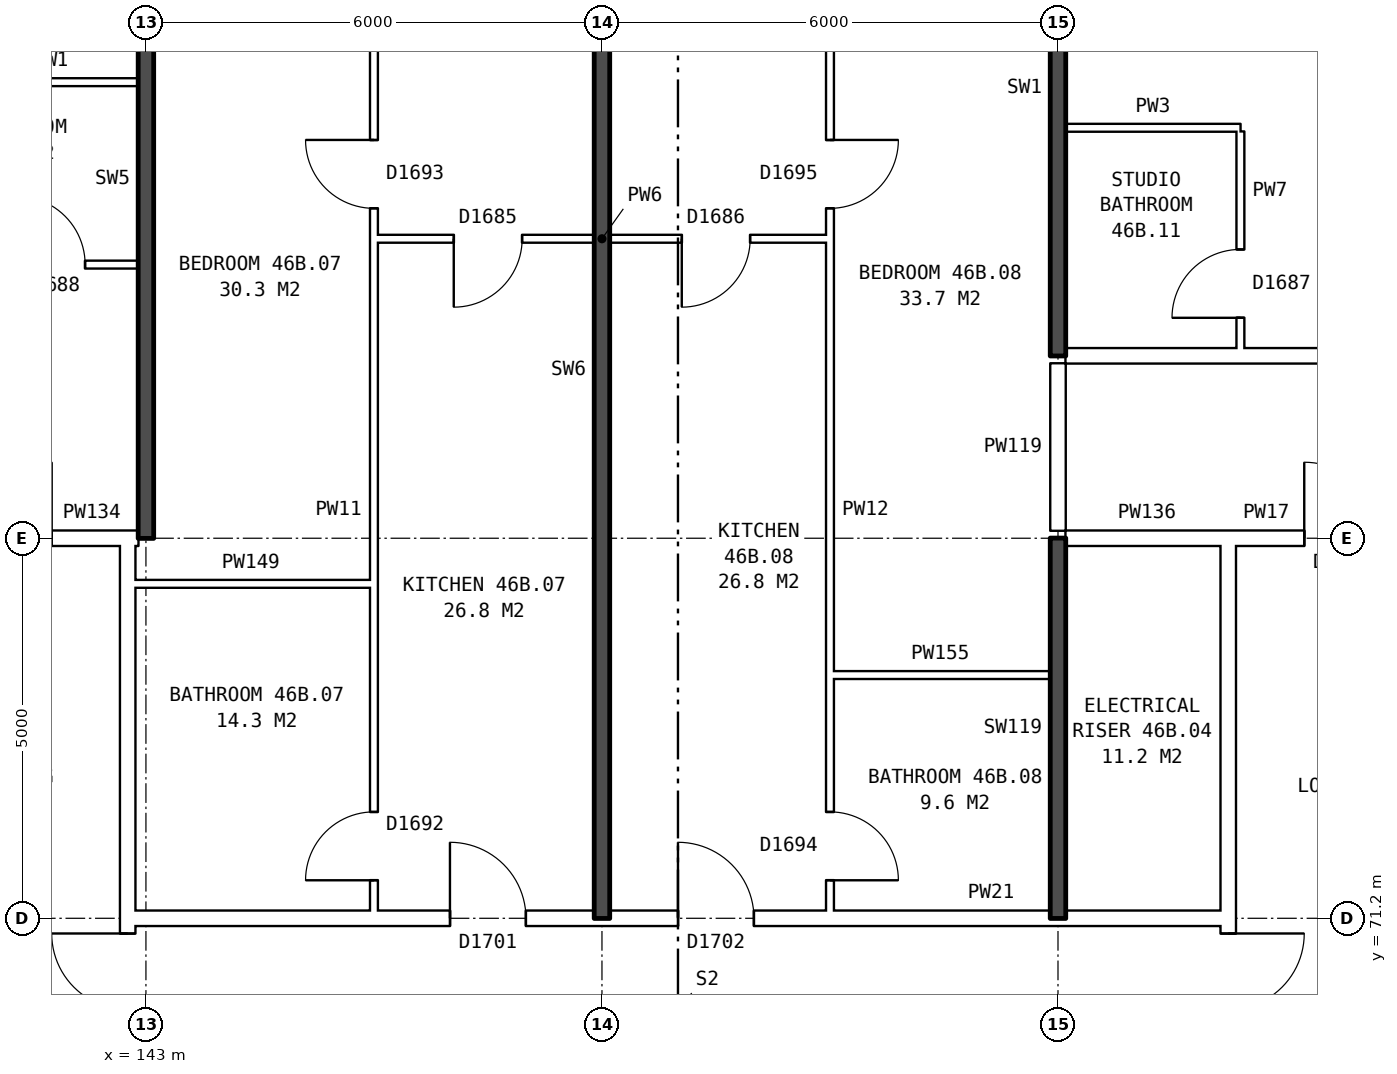
"""IFC4 building model, lengths in metres.
Left out: names, types, materials, properties, quantities, classifications, styles, units other than length and angle.
Written with IfcOpenShell. Run it as: python <this file> out.ifc"""

import sys

from ifc_helpers import new_model, si_unit, direction, frame, frame_2d, origin, place, context, subcontext, project, spatial, rectangle, extrude, element, fill, save


model = new_model("IFC4")
c1 = context("Model", 3, precision=1e-05, world=origin(), true_north=direction((0.0, 1.0)))
c2 = subcontext(c1, "Body", "Model", "MODEL_VIEW")
j1 = project(units=[si_unit("LENGTHUNIT", "METRE"), si_unit("PLANEANGLEUNIT", "RADIAN")], contexts=[c1])
p1 = place(None, origin())
s1 = spatial("IfcSite", under=j1, at=p1, CompositionType="ELEMENT")
p2 = place(p1, origin())
s2 = spatial("IfcBuilding", under=s1, at=p2, CompositionType="ELEMENT")
p3 = place(p2, frame((0.0, 0.0, 164.0)))
s3 = spatial("IfcBuildingStorey", under=s2, at=p3, CompositionType="ELEMENT", Elevation=164.0)
p4 = place(p3, frame((142.76, 63.9, 0.0), z_axis=(0.0, 0.0, 1.0), x_axis=(0.0, 1.0, 0.0)))
e1 = element("IfcWall", 1, at=p4, inside=s3, PredefinedType="PARTITIONING", context=c2, shape_type="SweptSolid", body=[
    extrude(rectangle(XDim=12.2, YDim=0.2, at=frame_2d((6.1, 0.0))), origin(), (0.0, 0.0, 1.0), 2.85),
])
p5 = place(p4, frame((5.1, 0.0, 0.0)))
e2 = element("IfcOpeningElement", 2, at=p5, cuts=e1, PredefinedType="OPENING", context=c2, shape_type="SweptSolid", body=[
    extrude(rectangle(XDim=2.0, YDim=2.1, at=frame_2d((1.0, 1.05))), frame((0.0, 0.11, 0.0), z_axis=(0.0, -1.0, 0.0), x_axis=(1.0, 0.0, 0.0)), (0.0, 0.0, 1.0), 0.22),
])
p6 = place(p3, frame((157.24, 63.9, 0.0), z_axis=(0.0, 0.0, 1.0), x_axis=(0.0, 1.0, 0.0)))
e3 = element("IfcWall", 3, at=p6, inside=s3, PredefinedType="PARTITIONING", context=c2, shape_type="SweptSolid", body=[
    extrude(rectangle(XDim=12.2, YDim=0.2, at=frame_2d((6.1, 0.0))), origin(), (0.0, 0.0, 1.0), 2.85),
])
p7 = place(p6, frame((5.1, 0.0, 0.0)))
e4 = element("IfcOpeningElement", 4, at=p7, cuts=e3, PredefinedType="OPENING", context=c2, shape_type="SweptSolid", body=[
    extrude(rectangle(XDim=2.0, YDim=2.1, at=frame_2d((1.0, 1.05))), frame((0.0, 0.11, 0.0), z_axis=(0.0, -1.0, 0.0), x_axis=(1.0, 0.0, 0.0)), (0.0, 0.0, 1.0), 0.22),
])
p8 = place(p3, frame((142.76, 71.2, 0.0), z_axis=(0.0, 0.0, 1.0), x_axis=(1.0, 0.0, 0.0)))
e5 = element("IfcWall", 5, at=p8, inside=s3, PredefinedType="PARTITIONING", context=c2, shape_type="SweptSolid", body=[
    extrude(rectangle(XDim=14.48, YDim=0.2, at=frame_2d((7.24, 0.0))), origin(), (0.0, 0.0, 1.0), 2.85),
])
p9 = place(p8, frame((4.24, 0.0, 0.0)))
e6 = element("IfcOpeningElement", 6, at=p9, cuts=e5, PredefinedType="OPENING", context=c2, shape_type="SweptSolid", body=[
    extrude(rectangle(XDim=1.0, YDim=2.1, at=frame_2d((0.5, 1.05))), frame((0.0, 0.11, 0.0), z_axis=(0.0, -1.0, 0.0), x_axis=(1.0, 0.0, 0.0)), (0.0, 0.0, 1.0), 0.22),
])
p10 = place(p8, frame((7.24, 0.0, 0.0)))
e7 = element("IfcOpeningElement", 7, at=p10, cuts=e5, PredefinedType="OPENING", context=c2, shape_type="SweptSolid", body=[
    extrude(rectangle(XDim=1.0, YDim=2.1, at=frame_2d((0.5, 1.05))), frame((0.0, 0.11, 0.0), z_axis=(0.0, -1.0, 0.0), x_axis=(1.0, 0.0, 0.0)), (0.0, 0.0, 1.0), 0.22),
])
p11 = place(p3, frame((152.0, 74.4, 0.0), z_axis=(0.0, 0.0, 1.0), x_axis=(1.0, 0.0, 0.0)))
e8 = element("IfcWall", 8, at=p11, inside=s3, PredefinedType="PARTITIONING", context=c2, shape_type="SweptSolid", body=[
    extrude(rectangle(XDim=2.9, YDim=0.1, at=frame_2d((1.45, 0.0))), origin(), (0.0, 0.0, 1.0), 2.85),
])
p12 = place(p3, frame((142.76, 75.6, 0.0), z_axis=(0.0, 0.0, 1.0), x_axis=(1.0, 0.0, 0.0)))
e9 = element("IfcWall", 9, at=p12, inside=s3, PredefinedType="PARTITIONING", context=c2, shape_type="SweptSolid", body=[
    extrude(rectangle(XDim=3.24, YDim=0.1, at=frame_2d((1.62, 0.0))), origin(), (0.0, 0.0, 1.0), 2.85),
])
p13 = place(p3, frame((139.76, 76.2, 0.0), z_axis=(0.0, 0.0, 1.0), x_axis=(1.0, 0.0, 0.0)))
e10 = element("IfcWall", 10, at=p13, inside=s3, PredefinedType="PARTITIONING", context=c2, shape_type="SweptSolid", body=[
    extrude(rectangle(XDim=3.0, YDim=0.2, at=frame_2d((1.5, 0.0))), origin(), (0.0, 0.0, 1.0), 2.85),
])
p14 = place(p13, frame((1.0, 0.0, 0.0)))
e11 = element("IfcOpeningElement", 11, at=p14, cuts=e10, PredefinedType="OPENING", context=c2, shape_type="SweptSolid", body=[
    extrude(rectangle(XDim=1.0, YDim=2.1, at=frame_2d((0.5, 1.05))), frame((0.0, 0.11, 0.0), z_axis=(0.0, -1.0, 0.0), x_axis=(1.0, 0.0, 0.0)), (0.0, 0.0, 1.0), 0.22),
])
p15 = place(p3, frame((142.76, 76.2, 0.0), z_axis=(0.0, 0.0, 1.0), x_axis=(1.0, 0.0, 0.0)))
e12 = element("IfcWall", 12, at=p15, inside=s3, PredefinedType="PARTITIONING", context=c2, shape_type="SweptSolid", body=[
    extrude(rectangle(XDim=0.14, YDim=0.2, at=frame_2d((0.07, 0.0))), origin(), (0.0, 0.0, 1.0), 2.85),
])
p16 = place(p3, frame((155.1, 76.2, 0.0), z_axis=(0.0, 0.0, 1.0), x_axis=(1.0, 0.0, 0.0)))
e13 = element("IfcWall", 13, at=p16, inside=s3, PredefinedType="PARTITIONING", context=c2, shape_type="SweptSolid", body=[
    extrude(rectangle(XDim=2.14, YDim=0.2, at=frame_2d((1.07, 0.0))), origin(), (0.0, 0.0, 1.0), 2.85),
])
p17 = place(p3, frame((157.24, 76.2, 0.0), z_axis=(0.0, 0.0, 1.0), x_axis=(1.0, 0.0, 0.0)))
e14 = element("IfcWall", 14, at=p17, inside=s3, PredefinedType="PARTITIONING", context=c2, shape_type="SweptSolid", body=[
    extrude(rectangle(XDim=3.0, YDim=0.2, at=frame_2d((1.5, 0.0))), origin(), (0.0, 0.0, 1.0), 2.85),
])
p18 = place(p17, frame((1.0, 0.0, 0.0)))
e15 = element("IfcOpeningElement", 15, at=p18, cuts=e14, PredefinedType="OPENING", context=c2, shape_type="SweptSolid", body=[
    extrude(rectangle(XDim=1.0, YDim=2.1, at=frame_2d((0.5, 1.05))), frame((0.0, 0.11, 0.0), z_axis=(0.0, -1.0, 0.0), x_axis=(1.0, 0.0, 0.0)), (0.0, 0.0, 1.0), 0.22),
])
p19 = place(p3, frame((155.1, 78.6, 0.0), z_axis=(0.0, 0.0, 1.0), x_axis=(1.0, 0.0, 0.0)))
e16 = element("IfcWall", 16, at=p19, inside=s3, PredefinedType="PARTITIONING", context=c2, shape_type="SweptSolid", body=[
    extrude(rectangle(XDim=16.04, YDim=0.2, at=frame_2d((8.02, 0.0))), origin(), (0.0, 0.0, 1.0), 2.85),
])
p20 = place(p19, frame((3.6, 0.0, 0.0)))
e17 = element("IfcOpeningElement", 17, at=p20, cuts=e16, PredefinedType="OPENING", context=c2, shape_type="SweptSolid", body=[
    extrude(rectangle(XDim=1.0, YDim=2.1, at=frame_2d((0.5, 1.05))), frame((0.0, 0.11, 0.0), z_axis=(0.0, -1.0, 0.0), x_axis=(1.0, 0.0, 0.0)), (0.0, 0.0, 1.0), 0.22),
])
p21 = place(p19, frame((8.4, 0.0, 0.0)))
e18 = element("IfcOpeningElement", 18, at=p21, cuts=e16, PredefinedType="OPENING", context=c2, shape_type="SweptSolid", body=[
    extrude(rectangle(XDim=1.0, YDim=2.1, at=frame_2d((0.5, 1.05))), frame((0.0, 0.11, 0.0), z_axis=(0.0, -1.0, 0.0), x_axis=(1.0, 0.0, 0.0)), (0.0, 0.0, 1.0), 0.22),
])
p22 = place(p3, frame((137.1, 79.8, 0.0), z_axis=(0.0, 0.0, 1.0), x_axis=(1.0, 0.0, 0.0)))
e19 = element("IfcWall", 19, at=p22, inside=s3, PredefinedType="PARTITIONING", context=c2, shape_type="SweptSolid", body=[
    extrude(rectangle(XDim=5.8, YDim=0.1, at=frame_2d((2.9, 0.0))), origin(), (0.0, 0.0, 1.0), 2.85),
])
p23 = place(p22, frame((1.3, 0.0, 0.0)))
e20 = element("IfcOpeningElement", 20, at=p23, cuts=e19, PredefinedType="OPENING", context=c2, shape_type="SweptSolid", body=[
    extrude(rectangle(XDim=0.9, YDim=2.1, at=frame_2d((0.45, 1.05))), frame((0.0, 0.06, 0.0), z_axis=(0.0, -1.0, 0.0), x_axis=(1.0, 0.0, 0.0)), (0.0, 0.0, 1.0), 0.12),
])
p24 = place(p22, frame((4.2, 0.0, 0.0)))
e21 = element("IfcOpeningElement", 21, at=p24, cuts=e19, PredefinedType="OPENING", context=c2, shape_type="SweptSolid", body=[
    extrude(rectangle(XDim=0.9, YDim=2.1, at=frame_2d((0.45, 1.05))), frame((0.0, 0.06, 0.0), z_axis=(0.0, -1.0, 0.0), x_axis=(1.0, 0.0, 0.0)), (0.0, 0.0, 1.0), 0.12),
])
p25 = place(p3, frame((146.0, 80.14, 0.0), z_axis=(0.0, 0.0, 1.0), x_axis=(1.0, 0.0, 0.0)))
e22 = element("IfcWall", 22, at=p25, inside=s3, PredefinedType="PARTITIONING", context=c2, shape_type="SweptSolid", body=[
    extrude(rectangle(XDim=6.0, YDim=0.1, at=frame_2d((3.0, 0.0))), origin(), (0.0, 0.0, 1.0), 2.85),
])
p26 = place(p25, frame((1.05, 0.0, 0.0)))
e23 = element("IfcOpeningElement", 23, at=p26, cuts=e22, PredefinedType="OPENING", context=c2, shape_type="SweptSolid", body=[
    extrude(rectangle(XDim=0.9, YDim=2.1, at=frame_2d((0.45, 1.05))), frame((0.0, 0.06, 0.0), z_axis=(0.0, -1.0, 0.0), x_axis=(1.0, 0.0, 0.0)), (0.0, 0.0, 1.0), 0.12),
])
p27 = place(p25, frame((4.05, 0.0, 0.0)))
e24 = element("IfcOpeningElement", 24, at=p27, cuts=e22, PredefinedType="OPENING", context=c2, shape_type="SweptSolid", body=[
    extrude(rectangle(XDim=0.9, YDim=2.1, at=frame_2d((0.45, 1.05))), frame((0.0, 0.06, 0.0), z_axis=(0.0, -1.0, 0.0), x_axis=(1.0, 0.0, 0.0)), (0.0, 0.0, 1.0), 0.12),
])
for number, where, z_axis, x_axis in (
    (25, (155.1, 81.6, 0.0), (0.0, 0.0, 1.0), (1.0, 0.0, 0.0)),
    (26, (140.6, 82.2, 0.0), (0.0, 0.0, 1.0), (1.0, 0.0, 0.0)),
):
    element("IfcWall", number, at=place(p3, frame(where, z_axis=z_axis, x_axis=x_axis)), inside=s3, PredefinedType="PARTITIONING", context=c2, shape_type="SweptSolid", body=[
        extrude(rectangle(XDim=2.3, YDim=0.1, at=frame_2d((1.15, 0.0))), origin(), (0.0, 0.0, 1.0), 2.85),
    ])
p28 = place(p3, frame((143.0, 76.2, 0.0), z_axis=(0.0, 0.0, 1.0), x_axis=(0.0, 1.0, 0.0)))
e27 = element("IfcWall", 27, at=p28, inside=s3, PredefinedType="SOLIDWALL", context=c2, shape_type="SweptSolid", body=[
    extrude(rectangle(XDim=9.44, YDim=0.2, at=frame_2d((4.72, 0.0))), origin(), (0.0, 0.0, 1.0), 2.85),
])
p29 = place(p3, frame((146.0, 71.3, 0.0), z_axis=(0.0, 0.0, 1.0), x_axis=(0.0, 1.0, 0.0)))
e28 = element("IfcWall", 28, at=p29, inside=s3, PredefinedType="PARTITIONING", context=c2, shape_type="SweptSolid", body=[
    extrude(rectangle(XDim=14.34, YDim=0.1, at=frame_2d((7.17, 0.0))), origin(), (0.0, 0.0, 1.0), 2.85),
])
p30 = place(p29, frame((9.24, 0.0, 0.0)))
e29 = element("IfcOpeningElement", 29, at=p30, cuts=e28, PredefinedType="OPENING", context=c2, shape_type="SweptSolid", body=[
    extrude(rectangle(XDim=0.9, YDim=2.1, at=frame_2d((0.45, 1.05))), frame((0.0, 0.06, 0.0), z_axis=(0.0, -1.0, 0.0), x_axis=(1.0, 0.0, 0.0)), (0.0, 0.0, 1.0), 0.12),
])
p31 = place(p29, frame((0.4, 0.0, 0.0)))
e30 = element("IfcOpeningElement", 30, at=p31, cuts=e28, PredefinedType="OPENING", context=c2, shape_type="SweptSolid", body=[
    extrude(rectangle(XDim=0.9, YDim=2.1, at=frame_2d((0.45, 1.05))), frame((0.0, 0.06, 0.0), z_axis=(0.0, -1.0, 0.0), x_axis=(1.0, 0.0, 0.0)), (0.0, 0.0, 1.0), 0.12),
])
p32 = place(p3, frame((149.0, 71.2, 0.0), z_axis=(0.0, 0.0, 1.0), x_axis=(0.0, 1.0, 0.0)))
e31 = element("IfcWall", 31, at=p32, inside=s3, PredefinedType="SOLIDWALL", context=c2, shape_type="SweptSolid", body=[
    extrude(rectangle(XDim=14.44, YDim=0.2, at=frame_2d((7.22, 0.0))), origin(), (0.0, 0.0, 1.0), 2.85),
])
p33 = place(p3, frame((152.0, 71.3, 0.0), z_axis=(0.0, 0.0, 1.0), x_axis=(0.0, 1.0, 0.0)))
e32 = element("IfcWall", 32, at=p33, inside=s3, PredefinedType="PARTITIONING", context=c2, shape_type="SweptSolid", body=[
    extrude(rectangle(XDim=14.34, YDim=0.1, at=frame_2d((7.17, 0.0))), origin(), (0.0, 0.0, 1.0), 2.85),
])
p34 = place(p33, frame((9.24, 0.0, 0.0)))
e33 = element("IfcOpeningElement", 33, at=p34, cuts=e32, PredefinedType="OPENING", context=c2, shape_type="SweptSolid", body=[
    extrude(rectangle(XDim=0.9, YDim=2.1, at=frame_2d((0.45, 1.05))), frame((0.0, 0.06, 0.0), z_axis=(0.0, -1.0, 0.0), x_axis=(1.0, 0.0, 0.0)), (0.0, 0.0, 1.0), 0.12),
])
p35 = place(p33, frame((0.4, 0.0, 0.0)))
e34 = element("IfcOpeningElement", 34, at=p35, cuts=e32, PredefinedType="OPENING", context=c2, shape_type="SweptSolid", body=[
    extrude(rectangle(XDim=0.9, YDim=2.1, at=frame_2d((0.45, 1.05))), frame((0.0, 0.06, 0.0), z_axis=(0.0, -1.0, 0.0), x_axis=(1.0, 0.0, 0.0)), (0.0, 0.0, 1.0), 0.12),
])
p36 = place(p3, frame((155.0, 71.2, 0.0), z_axis=(0.0, 0.0, 1.0), x_axis=(0.0, 1.0, 0.0)))
e35 = element("IfcWall", 35, at=p36, inside=s3, PredefinedType="SOLIDWALL", context=c2, shape_type="SweptSolid", body=[
    extrude(rectangle(XDim=5.0, YDim=0.2, at=frame_2d((2.5, 0.0))), origin(), (0.0, 0.0, 1.0), 2.85),
])
p37 = place(p3, frame((155.0, 76.3, 0.0), z_axis=(0.0, 0.0, 1.0), x_axis=(0.0, 1.0, 0.0)))
e36 = element("IfcWall", 36, at=p37, inside=s3, PredefinedType="PARTITIONING", context=c2, shape_type="SweptSolid", body=[
    extrude(rectangle(XDim=2.2, YDim=0.2, at=frame_2d((1.1, 0.0))), origin(), (0.0, 0.0, 1.0), 2.85),
])
p38 = place(p3, frame((155.0, 78.6, 0.0), z_axis=(0.0, 0.0, 1.0), x_axis=(0.0, 1.0, 0.0)))
e37 = element("IfcWall", 37, at=p38, inside=s3, PredefinedType="SOLIDWALL", context=c2, shape_type="SweptSolid", body=[
    extrude(rectangle(XDim=7.04, YDim=0.2, at=frame_2d((3.52, 0.0))), origin(), (0.0, 0.0, 1.0), 2.85),
])
p39 = place(p3, frame((157.4, 78.7, 0.0), z_axis=(0.0, 0.0, 1.0), x_axis=(0.0, 1.0, 0.0)))
e38 = element("IfcWall", 38, at=p39, inside=s3, PredefinedType="PARTITIONING", context=c2, shape_type="SweptSolid", body=[
    extrude(rectangle(XDim=2.85, YDim=0.1, at=frame_2d((1.425, 0.0))), origin(), (0.0, 0.0, 1.0), 2.85),
])
p40 = place(p39, frame((0.4, 0.0, 0.0)))
e39 = element("IfcOpeningElement", 39, at=p40, cuts=e38, PredefinedType="OPENING", context=c2, shape_type="SweptSolid", body=[
    extrude(rectangle(XDim=0.9, YDim=2.1, at=frame_2d((0.45, 1.05))), frame((0.0, 0.06, 0.0), z_axis=(0.0, -1.0, 0.0), x_axis=(1.0, 0.0, 0.0)), (0.0, 0.0, 1.0), 0.12),
])
p41 = place(p5, origin())
e40 = element("IfcDoor", 40, at=p41, inside=s3, OperationType="DOUBLE_DOOR_SINGLE_SWING", PredefinedType="DOOR", context=c2, shape_type="SweptSolid", body=[
    extrude(rectangle(XDim=2.0, YDim=2.1, at=frame_2d((1.0, 1.05))), frame((0.0, 0.025, 0.0), z_axis=(0.0, -1.0, 0.0), x_axis=(1.0, 0.0, 0.0)), (0.0, 0.0, 1.0), 0.05),
])
fill(e2, e40)
p42 = place(p7, frame((2.0, 0.0, 0.0), z_axis=(0.0, 0.0, 1.0), x_axis=(-1.0, 0.0, 0.0)))
e41 = element("IfcDoor", 41, at=p42, inside=s3, OperationType="DOUBLE_DOOR_SINGLE_SWING", PredefinedType="DOOR", context=c2, shape_type="SweptSolid", body=[
    extrude(rectangle(XDim=2.0, YDim=2.1, at=frame_2d((1.0, 1.05))), frame((0.0, 0.025, 0.0), z_axis=(0.0, -1.0, 0.0), x_axis=(1.0, 0.0, 0.0)), (0.0, 0.0, 1.0), 0.05),
])
fill(e4, e41)
p43 = place(p18, origin())
e42 = element("IfcDoor", 42, at=p43, inside=s3, OperationType="SINGLE_SWING_LEFT", PredefinedType="DOOR", context=c2, shape_type="SweptSolid", body=[
    extrude(rectangle(XDim=1.0, YDim=2.1, at=frame_2d((0.5, 1.05))), frame((0.0, 0.025, 0.0), z_axis=(0.0, -1.0, 0.0), x_axis=(1.0, 0.0, 0.0)), (0.0, 0.0, 1.0), 0.05),
])
fill(e15, e42)
p44 = place(p24, origin())
e43 = element("IfcDoor", 43, at=p44, inside=s3, OperationType="SINGLE_SWING_LEFT", PredefinedType="DOOR", context=c2, shape_type="SweptSolid", body=[
    extrude(rectangle(XDim=0.9, YDim=2.1, at=frame_2d((0.45, 1.05))), frame((0.0, 0.025, 0.0), z_axis=(0.0, -1.0, 0.0), x_axis=(1.0, 0.0, 0.0)), (0.0, 0.0, 1.0), 0.05),
])
fill(e21, e43)
p45 = place(p30, origin())
e44 = element("IfcDoor", 44, at=p45, inside=s3, OperationType="SINGLE_SWING_RIGHT", PredefinedType="DOOR", context=c2, shape_type="SweptSolid", body=[
    extrude(rectangle(XDim=0.9, YDim=2.1, at=frame_2d((0.45, 1.05))), frame((0.0, 0.025, 0.0), z_axis=(0.0, -1.0, 0.0), x_axis=(1.0, 0.0, 0.0)), (0.0, 0.0, 1.0), 0.05),
])
fill(e29, e44)
p46 = place(p9, origin())
e45 = element("IfcDoor", 45, at=p46, inside=s3, OperationType="SINGLE_SWING_LEFT", PredefinedType="DOOR", context=c2, shape_type="SweptSolid", body=[
    extrude(rectangle(XDim=1.0, YDim=2.1, at=frame_2d((0.5, 1.05))), frame((0.0, 0.025, 0.0), z_axis=(0.0, -1.0, 0.0), x_axis=(1.0, 0.0, 0.0)), (0.0, 0.0, 1.0), 0.05),
])
fill(e6, e45)
p47 = place(p26, frame((0.9, 0.0, 0.0), z_axis=(0.0, 0.0, 1.0), x_axis=(-1.0, 0.0, 0.0)))
e46 = element("IfcDoor", 46, at=p47, inside=s3, OperationType="SINGLE_SWING_RIGHT", PredefinedType="DOOR", context=c2, shape_type="SweptSolid", body=[
    extrude(rectangle(XDim=0.9, YDim=2.1, at=frame_2d((0.45, 1.05))), frame((0.0, 0.025, 0.0), z_axis=(0.0, -1.0, 0.0), x_axis=(1.0, 0.0, 0.0)), (0.0, 0.0, 1.0), 0.05),
])
fill(e23, e46)
p48 = place(p31, origin())
e47 = element("IfcDoor", 47, at=p48, inside=s3, OperationType="SINGLE_SWING_LEFT", PredefinedType="DOOR", context=c2, shape_type="SweptSolid", body=[
    extrude(rectangle(XDim=0.9, YDim=2.1, at=frame_2d((0.45, 1.05))), frame((0.0, 0.025, 0.0), z_axis=(0.0, -1.0, 0.0), x_axis=(1.0, 0.0, 0.0)), (0.0, 0.0, 1.0), 0.05),
])
fill(e30, e47)
p49 = place(p34, frame((0.9, 0.0, 0.0), z_axis=(0.0, 0.0, 1.0), x_axis=(-1.0, 0.0, 0.0)))
e48 = element("IfcDoor", 48, at=p49, inside=s3, OperationType="SINGLE_SWING_LEFT", PredefinedType="DOOR", context=c2, shape_type="SweptSolid", body=[
    extrude(rectangle(XDim=0.9, YDim=2.1, at=frame_2d((0.45, 1.05))), frame((0.0, 0.025, 0.0), z_axis=(0.0, -1.0, 0.0), x_axis=(1.0, 0.0, 0.0)), (0.0, 0.0, 1.0), 0.05),
])
fill(e33, e48)
p50 = place(p10, origin())
e49 = element("IfcDoor", 49, at=p50, inside=s3, OperationType="SINGLE_SWING_LEFT", PredefinedType="DOOR", context=c2, shape_type="SweptSolid", body=[
    extrude(rectangle(XDim=1.0, YDim=2.1, at=frame_2d((0.5, 1.05))), frame((0.0, 0.025, 0.0), z_axis=(0.0, -1.0, 0.0), x_axis=(1.0, 0.0, 0.0)), (0.0, 0.0, 1.0), 0.05),
])
fill(e7, e49)
p51 = place(p27, frame((0.9, 0.0, 0.0), z_axis=(0.0, 0.0, 1.0), x_axis=(-1.0, 0.0, 0.0)))
e50 = element("IfcDoor", 50, at=p51, inside=s3, OperationType="SINGLE_SWING_RIGHT", PredefinedType="DOOR", context=c2, shape_type="SweptSolid", body=[
    extrude(rectangle(XDim=0.9, YDim=2.1, at=frame_2d((0.45, 1.05))), frame((0.0, 0.025, 0.0), z_axis=(0.0, -1.0, 0.0), x_axis=(1.0, 0.0, 0.0)), (0.0, 0.0, 1.0), 0.05),
])
fill(e24, e50)
p52 = place(p35, frame((0.9, 0.0, 0.0), z_axis=(0.0, 0.0, 1.0), x_axis=(-1.0, 0.0, 0.0)))
e51 = element("IfcDoor", 51, at=p52, inside=s3, OperationType="SINGLE_SWING_RIGHT", PredefinedType="DOOR", context=c2, shape_type="SweptSolid", body=[
    extrude(rectangle(XDim=0.9, YDim=2.1, at=frame_2d((0.45, 1.05))), frame((0.0, 0.025, 0.0), z_axis=(0.0, -1.0, 0.0), x_axis=(1.0, 0.0, 0.0)), (0.0, 0.0, 1.0), 0.05),
])
fill(e34, e51)
p53 = place(p40, origin())
e52 = element("IfcDoor", 52, at=p53, inside=s3, OperationType="SINGLE_SWING_LEFT", PredefinedType="DOOR", context=c2, shape_type="SweptSolid", body=[
    extrude(rectangle(XDim=0.9, YDim=2.1, at=frame_2d((0.45, 1.05))), frame((0.0, 0.025, 0.0), z_axis=(0.0, -1.0, 0.0), x_axis=(1.0, 0.0, 0.0)), (0.0, 0.0, 1.0), 0.05),
])
fill(e39, e52)
save(model, sys.argv[1])
